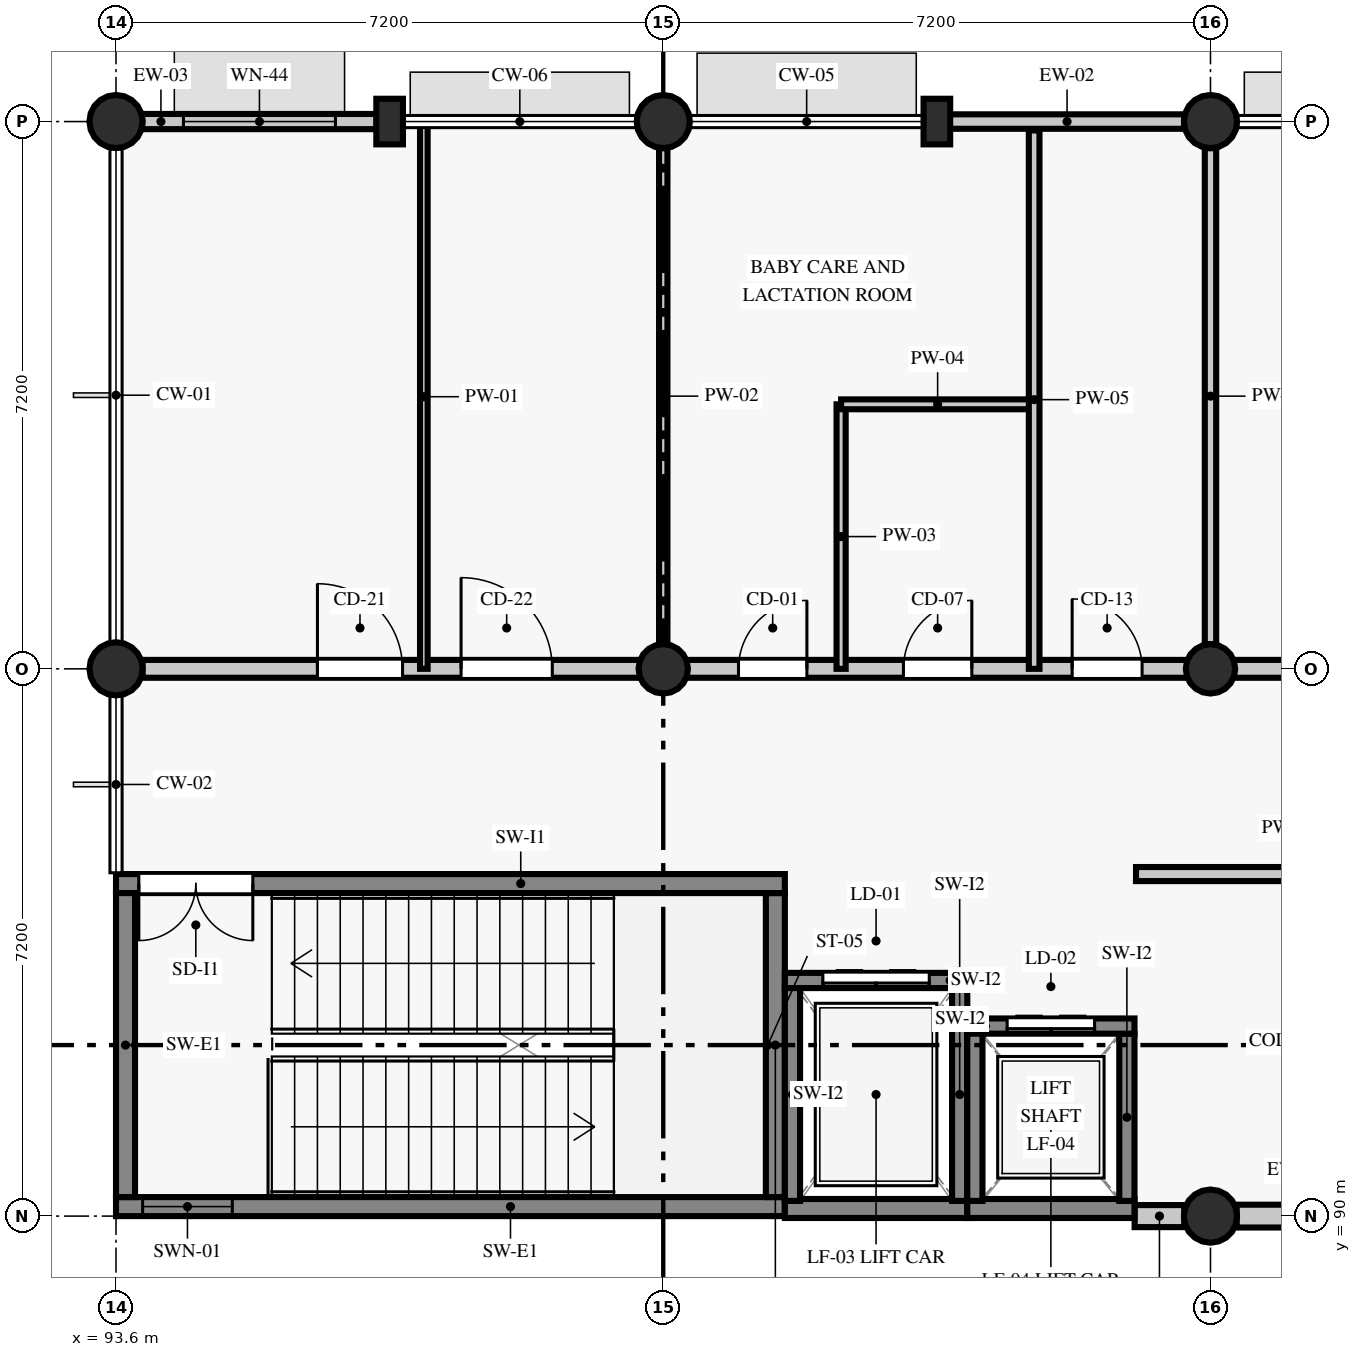
"""IFC4 building model, lengths in metres.
Left out: names, types, materials, properties, quantities, classifications, styles, units other than length and angle.
Written with IfcOpenShell. Run it as: python <this file> out.ifc"""

import sys

from ifc_helpers import new_model, si_unit, direction, frame, frame_2d, origin, origin_2d, place, context, subcontext, project, spatial, rectangle, circle, extrude, element, fill, save


model = new_model("IFC4")
c1 = context("Model", 3, precision=1e-05, world=origin(), true_north=direction((0.0, 1.0)))
c2 = subcontext(c1, "Body", "Model", "MODEL_VIEW")
j1 = project(units=[si_unit("LENGTHUNIT", "METRE"), si_unit("PLANEANGLEUNIT", "RADIAN")], contexts=[c1])
p1 = place(None, origin())
s1 = spatial("IfcSite", under=j1, at=p1, CompositionType="ELEMENT")
p2 = place(p1, origin())
s2 = spatial("IfcBuilding", under=s1, at=p2, CompositionType="ELEMENT")
p3 = place(p2, frame((0.0, 0.0, 4.8)))
s3 = spatial("IfcBuildingStorey", under=s2, at=p3, CompositionType="ELEMENT", Elevation=4.8)
for number, where, z_axis, x_axis in (
    (1, (93.6, 97.2, 0.0), (0.0, 0.0, 1.0), (1.0, 0.0, 0.0)),
    (2, (93.6, 104.4, 0.0), (0.0, 0.0, 1.0), (1.0, 0.0, 0.0)),
):
    element("IfcColumn", number, at=place(p3, frame(where, z_axis=z_axis, x_axis=x_axis)), inside=s3, PredefinedType="COLUMN", context=c2, shape_type="SweptSolid", body=[
        extrude(circle(Radius=0.35, at=origin_2d()), origin(), (0.0, 0.0, 1.0), 4.53),
    ])
p4 = place(p3, frame((100.8, 97.2, 0.0), z_axis=(0.0, 0.0, 1.0), x_axis=(1.0, 0.0, 0.0)))
e3 = element("IfcColumn", 3, at=p4, inside=s3, PredefinedType="COLUMN", context=c2, shape_type="SweptSolid", body=[
    extrude(circle(Radius=0.325, at=origin_2d()), origin(), (0.0, 0.0, 1.0), 4.53),
])
for number, where, z_axis, x_axis in (
    (4, (100.8, 104.4, 0.0), (0.0, 0.0, 1.0), (1.0, 0.0, 0.0)),
    (5, (108.0, 90.0, 0.0), (0.0, 0.0, 1.0), (1.0, 0.0, 0.0)),
):
    element("IfcColumn", number, at=place(p3, frame(where, z_axis=z_axis, x_axis=x_axis)), inside=s3, PredefinedType="COLUMN", context=c2, shape_type="SweptSolid", body=[
        extrude(circle(Radius=0.35, at=origin_2d()), origin(), (0.0, 0.0, 1.0), 4.53),
    ])
p5 = place(p3, frame((108.0, 97.2, 0.0), z_axis=(0.0, 0.0, 1.0), x_axis=(1.0, 0.0, 0.0)))
e6 = element("IfcColumn", 6, at=p5, inside=s3, PredefinedType="COLUMN", context=c2, shape_type="SweptSolid", body=[
    extrude(circle(Radius=0.325, at=origin_2d()), origin(), (0.0, 0.0, 1.0), 4.53),
])
p6 = place(p3, frame((108.0, 104.4, 0.0), z_axis=(0.0, 0.0, 1.0), x_axis=(1.0, 0.0, 0.0)))
e7 = element("IfcColumn", 7, at=p6, inside=s3, PredefinedType="COLUMN", context=c2, shape_type="SweptSolid", body=[
    extrude(circle(Radius=0.35, at=origin_2d()), origin(), (0.0, 0.0, 1.0), 4.53),
])
for number, where, z_axis, x_axis in (
    (8, (97.2, 104.4, 0.0), (0.0, 0.0, 1.0), (1.0, 0.0, 0.0)),
    (9, (104.4, 104.4, 0.0), (0.0, 0.0, 1.0), (1.0, 0.0, 0.0)),
):
    element("IfcColumn", number, at=place(p3, frame(where, z_axis=z_axis, x_axis=x_axis)), inside=s3, PredefinedType="PILASTER", context=c2, shape_type="SweptSolid", body=[
        extrude(rectangle(XDim=0.35, YDim=0.6, at=origin_2d()), origin(), (0.0, 0.0, 1.0), 4.53),
    ])
p7 = place(p3, frame((107.002, 90.0, 0.0), z_axis=(0.0, 0.0, 1.0), x_axis=(1.0, 0.0, 0.0)))
e10 = element("IfcWall", 10, at=p7, inside=s3, PredefinedType="STANDARD", context=c2, shape_type="SweptSolid", body=[
    extrude(rectangle(XDim=0.653, YDim=0.29, at=frame_2d((0.327, 0.0))), origin(), (0.0, 0.0, 1.0), 4.53),
])
p8 = place(p3, frame((108.345, 90.0, 0.0), z_axis=(0.0, 0.0, 1.0), x_axis=(1.0, 0.0, 0.0)))
e11 = element("IfcWall", 11, at=p8, inside=s3, PredefinedType="STANDARD", context=c2, shape_type="SweptSolid", body=[
    extrude(rectangle(XDim=5.253, YDim=0.3, at=frame_2d((2.626, 0.0))), origin(), (0.0, 0.0, 1.0), 4.53),
])
p9 = place(p8, frame((1.576, 0.0, 0.9)))
e12 = element("IfcOpeningElement", 12, at=p9, cuts=e11, PredefinedType="OPENING", context=c2, shape_type="SweptSolid", body=[
    extrude(rectangle(XDim=2.1, YDim=1.66, at=frame_2d((1.05, 0.83))), frame((0.0, 0.16, 0.0), z_axis=(0.0, -1.0, 0.0), x_axis=(1.0, 0.0, 0.0)), (0.0, 0.0, 1.0), 0.32),
])
p10 = place(p3, frame((107.655, 104.4, 0.0), z_axis=(0.0, 0.0, 1.0), x_axis=(-1.0, 0.0, 0.0)))
e13 = element("IfcWall", 13, at=p10, inside=s3, PredefinedType="STANDARD", context=c2, shape_type="SweptSolid", body=[
    extrude(rectangle(XDim=3.084, YDim=0.19, at=frame_2d((1.542, 0.0))), origin(), (0.0, 0.0, 1.0), 3.88),
])
p11 = place(p3, frame((97.029, 104.4, 0.0), z_axis=(0.0, 0.0, 1.0), x_axis=(-1.0, 0.0, 0.0)))
e14 = element("IfcWall", 14, at=p11, inside=s3, PredefinedType="STANDARD", context=c2, shape_type="SweptSolid", body=[
    extrude(rectangle(XDim=3.084, YDim=0.2, at=frame_2d((1.542, 0.0))), origin(), (0.0, 0.0, 1.0), 3.88),
])
p12 = place(p11, frame((0.542, 0.0, 0.9)))
e15 = element("IfcOpeningElement", 15, at=p12, cuts=e14, PredefinedType="OPENING", context=c2, shape_type="SweptSolid", body=[
    extrude(rectangle(XDim=2.0, YDim=1.78, at=frame_2d((1.0, 0.89))), frame((0.0, 0.11, 0.0), z_axis=(0.0, -1.0, 0.0), x_axis=(1.0, 0.0, 0.0)), (0.0, 0.0, 1.0), 0.22),
])
p13 = place(p3, frame((93.6, 90.125, 0.0), z_axis=(0.0, 0.0, 1.0), x_axis=(1.0, 0.0, 0.0)))
e16 = element("IfcWall", 16, at=p13, inside=s3, PredefinedType="SHEAR", context=c2, shape_type="SweptSolid", body=[
    extrude(rectangle(XDim=8.8, YDim=0.25, at=frame_2d((4.4, 0.0))), origin(), (0.0, 0.0, 1.0), 4.53),
])
p14 = place(p13, frame((0.35, 0.0, 0.92)))
e17 = element("IfcOpeningElement", 17, at=p14, cuts=e16, PredefinedType="OPENING", context=c2, shape_type="SweptSolid", body=[
    extrude(rectangle(XDim=1.18, YDim=1.48, at=frame_2d((0.59, 0.74))), frame((0.0, 0.135, 0.0), z_axis=(0.0, -1.0, 0.0), x_axis=(1.0, 0.0, 0.0)), (0.0, 0.0, 1.0), 0.27),
])
p15 = place(p3, frame((102.275, 90.25, 0.0), z_axis=(0.0, 0.0, 1.0), x_axis=(0.0, 1.0, 0.0)))
e18 = element("IfcWall", 18, at=p15, inside=s3, PredefinedType="SHEAR", context=c2, shape_type="SweptSolid", body=[
    extrude(rectangle(XDim=4.0, YDim=0.25, at=frame_2d((2.0, 0.0))), origin(), (0.0, 0.0, 1.0), 4.53),
])
p16 = place(p3, frame((102.4, 94.375, 0.0), z_axis=(0.0, 0.0, 1.0), x_axis=(-1.0, 0.0, 0.0)))
e19 = element("IfcWall", 19, at=p16, inside=s3, PredefinedType="SHEAR", context=c2, shape_type="SweptSolid", body=[
    extrude(rectangle(XDim=8.8, YDim=0.25, at=frame_2d((4.4, 0.0))), origin(), (0.0, 0.0, 1.0), 4.53),
])
p17 = place(p16, frame((7.0, 0.0, 0.0)))
e20 = element("IfcOpeningElement", 20, at=p17, cuts=e19, PredefinedType="OPENING", context=c2, shape_type="SweptSolid", body=[
    extrude(rectangle(XDim=1.5, YDim=2.15, at=frame_2d((0.75, 1.075))), frame((0.0, 0.135, 0.0), z_axis=(0.0, -1.0, 0.0), x_axis=(1.0, 0.0, 0.0)), (0.0, 0.0, 1.0), 0.27),
])
p18 = place(p3, frame((93.725, 94.25, 0.0), z_axis=(0.0, 0.0, 1.0), x_axis=(0.0, -1.0, 0.0)))
e21 = element("IfcWall", 21, at=p18, inside=s3, PredefinedType="SHEAR", context=c2, shape_type="SweptSolid", body=[
    extrude(rectangle(XDim=4.0, YDim=0.25, at=frame_2d((2.0, 0.0))), origin(), (0.0, 0.0, 1.0), 4.53),
])
p19 = place(p3, frame((102.4, 90.1, 0.0), z_axis=(0.0, 0.0, 1.0), x_axis=(1.0, 0.0, 0.0)))
e22 = element("IfcWall", 22, at=p19, inside=s3, PredefinedType="SHEAR", context=c2, shape_type="SweptSolid", body=[
    extrude(rectangle(XDim=2.4, YDim=0.25, at=frame_2d((1.2, 0.0))), origin(), (0.0, 0.0, 1.0), 4.53),
])
p20 = place(p3, frame((104.7, 90.2, 0.0), z_axis=(0.0, 0.0, 1.0), x_axis=(0.0, 1.0, 0.0)))
e23 = element("IfcWall", 23, at=p20, inside=s3, PredefinedType="SHEAR", context=c2, shape_type="SweptSolid", body=[
    extrude(rectangle(XDim=2.8, YDim=0.2, at=frame_2d((1.4, 0.0))), origin(), (0.0, 0.0, 1.0), 4.53),
])
p21 = place(p3, frame((104.8, 93.1, 0.0), z_axis=(0.0, 0.0, 1.0), x_axis=(-1.0, 0.0, 0.0)))
e24 = element("IfcWall", 24, at=p21, inside=s3, PredefinedType="SHEAR", context=c2, shape_type="SweptSolid", body=[
    extrude(rectangle(XDim=2.4, YDim=0.2, at=frame_2d((1.2, 0.0))), origin(), (0.0, 0.0, 1.0), 4.53),
])
p22 = place(p21, frame((0.5, 0.0, 0.0)))
e25 = element("IfcOpeningElement", 25, at=p22, cuts=e24, PredefinedType="OPENING", context=c2, shape_type="SweptSolid", body=[
    extrude(rectangle(XDim=1.4, YDim=2.15, at=frame_2d((0.7, 1.075))), frame((0.0, 0.11, 0.0), z_axis=(0.0, -1.0, 0.0), x_axis=(1.0, 0.0, 0.0)), (0.0, 0.0, 1.0), 0.22),
])
p23 = place(p3, frame((102.5, 93.0, 0.0), z_axis=(0.0, 0.0, 1.0), x_axis=(0.0, -1.0, 0.0)))
e26 = element("IfcWall", 26, at=p23, inside=s3, PredefinedType="SHEAR", context=c2, shape_type="SweptSolid", body=[
    extrude(rectangle(XDim=2.8, YDim=0.2, at=frame_2d((1.4, 0.0))), origin(), (0.0, 0.0, 1.0), 4.53),
])
p24 = place(p3, frame((104.8, 90.1, 0.0), z_axis=(0.0, 0.0, 1.0), x_axis=(1.0, 0.0, 0.0)))
e27 = element("IfcWall", 27, at=p24, inside=s3, PredefinedType="SHEAR", context=c2, shape_type="SweptSolid", body=[
    extrude(rectangle(XDim=2.2, YDim=0.25, at=frame_2d((1.1, 0.0))), origin(), (0.0, 0.0, 1.0), 4.53),
])
p25 = place(p3, frame((106.9, 90.2, 0.0), z_axis=(0.0, 0.0, 1.0), x_axis=(0.0, 1.0, 0.0)))
e28 = element("IfcWall", 28, at=p25, inside=s3, PredefinedType="SHEAR", context=c2, shape_type="SweptSolid", body=[
    extrude(rectangle(XDim=2.2, YDim=0.2, at=frame_2d((1.1, 0.0))), origin(), (0.0, 0.0, 1.0), 4.53),
])
p26 = place(p3, frame((107.0, 92.5, 0.0), z_axis=(0.0, 0.0, 1.0), x_axis=(-1.0, 0.0, 0.0)))
e29 = element("IfcWall", 29, at=p26, inside=s3, PredefinedType="SHEAR", context=c2, shape_type="SweptSolid", body=[
    extrude(rectangle(XDim=2.2, YDim=0.2, at=frame_2d((1.1, 0.0))), origin(), (0.0, 0.0, 1.0), 4.53),
])
p27 = place(p26, frame((0.525, 0.0, 0.0)))
e30 = element("IfcOpeningElement", 30, at=p27, cuts=e29, PredefinedType="OPENING", context=c2, shape_type="SweptSolid", body=[
    extrude(rectangle(XDim=1.15, YDim=2.15, at=frame_2d((0.575, 1.075))), frame((0.0, 0.11, 0.0), z_axis=(0.0, -1.0, 0.0), x_axis=(1.0, 0.0, 0.0)), (0.0, 0.0, 1.0), 0.22),
])
p28 = place(p3, frame((104.9, 92.4, 0.0), z_axis=(0.0, 0.0, 1.0), x_axis=(0.0, -1.0, 0.0)))
e31 = element("IfcWall", 31, at=p28, inside=s3, PredefinedType="SHEAR", context=c2, shape_type="SweptSolid", body=[
    extrude(rectangle(XDim=2.2, YDim=0.2, at=frame_2d((1.1, 0.0))), origin(), (0.0, 0.0, 1.0), 4.53),
])
p29 = place(p3, frame((93.95, 97.2, 0.0), z_axis=(0.0, 0.0, 1.0), x_axis=(1.0, 0.0, 0.0)))
e32 = element("IfcWall", 32, at=p29, inside=s3, PredefinedType="PARTITIONING", context=c2, shape_type="SweptSolid", body=[
    extrude(rectangle(XDim=28.1, YDim=0.235, at=frame_2d((14.05, 0.0))), origin(), (0.0, 0.0, 1.0), 3.78),
])
p30 = place(p29, frame((2.3, 0.0, 0.0)))
e33 = element("IfcOpeningElement", 33, at=p30, cuts=e32, PredefinedType="OPENING", context=c2, shape_type="SweptSolid", body=[
    extrude(rectangle(XDim=1.12, YDim=2.23, at=frame_2d((0.56, 1.115))), frame((0.0, 0.127, 0.0), z_axis=(0.0, -1.0, 0.0), x_axis=(1.0, 0.0, 0.0)), (0.0, 0.0, 1.0), 0.255),
])
p31 = place(p29, frame((4.19, 0.0, 0.0)))
e34 = element("IfcOpeningElement", 34, at=p31, cuts=e32, PredefinedType="OPENING", context=c2, shape_type="SweptSolid", body=[
    extrude(rectangle(XDim=1.2, YDim=2.23, at=frame_2d((0.6, 1.115))), frame((0.0, 0.127, 0.0), z_axis=(0.0, -1.0, 0.0), x_axis=(1.0, 0.0, 0.0)), (0.0, 0.0, 1.0), 0.255),
])
p32 = place(p29, frame((7.84, 0.0, 0.0)))
e35 = element("IfcOpeningElement", 35, at=p32, cuts=e32, PredefinedType="OPENING", context=c2, shape_type="SweptSolid", body=[
    extrude(rectangle(XDim=0.9, YDim=2.08, at=frame_2d((0.45, 1.04))), frame((0.0, 0.127, 0.0), z_axis=(0.0, -1.0, 0.0), x_axis=(1.0, 0.0, 0.0)), (0.0, 0.0, 1.0), 0.255),
])
p33 = place(p29, frame((10.01, 0.0, 0.0)))
e36 = element("IfcOpeningElement", 36, at=p33, cuts=e32, PredefinedType="OPENING", context=c2, shape_type="SweptSolid", body=[
    extrude(rectangle(XDim=0.9, YDim=2.13, at=frame_2d((0.45, 1.065))), frame((0.0, 0.127, 0.0), z_axis=(0.0, -1.0, 0.0), x_axis=(1.0, 0.0, 0.0)), (0.0, 0.0, 1.0), 0.255),
])
p34 = place(p29, frame((12.23, 0.0, 0.0)))
e37 = element("IfcOpeningElement", 37, at=p34, cuts=e32, PredefinedType="OPENING", context=c2, shape_type="SweptSolid", body=[
    extrude(rectangle(XDim=0.92, YDim=2.18, at=frame_2d((0.46, 1.09))), frame((0.0, 0.127, 0.0), z_axis=(0.0, -1.0, 0.0), x_axis=(1.0, 0.0, 0.0)), (0.0, 0.0, 1.0), 0.255),
])
p35 = place(p29, frame((16.705, 0.0, 0.0)))
e38 = element("IfcOpeningElement", 38, at=p35, cuts=e32, PredefinedType="OPENING", context=c2, shape_type="SweptSolid", body=[
    extrude(rectangle(XDim=1.02, YDim=2.08, at=frame_2d((0.51, 1.04))), frame((0.0, 0.127, 0.0), z_axis=(0.0, -1.0, 0.0), x_axis=(1.0, 0.0, 0.0)), (0.0, 0.0, 1.0), 0.255),
])
p36 = place(p29, frame((18.365, 0.0, 0.0)))
e39 = element("IfcOpeningElement", 39, at=p36, cuts=e32, PredefinedType="OPENING", context=c2, shape_type="SweptSolid", body=[
    extrude(rectangle(XDim=1.06, YDim=2.08, at=frame_2d((0.53, 1.04))), frame((0.0, 0.127, 0.0), z_axis=(0.0, -1.0, 0.0), x_axis=(1.0, 0.0, 0.0)), (0.0, 0.0, 1.0), 0.255),
])
p37 = place(p29, frame((24.513, 0.0, 0.0)))
e40 = element("IfcOpeningElement", 40, at=p37, cuts=e32, PredefinedType="OPENING", context=c2, shape_type="SweptSolid", body=[
    extrude(rectangle(XDim=1.1, YDim=2.08, at=frame_2d((0.55, 1.04))), frame((0.0, 0.127, 0.0), z_axis=(0.0, -1.0, 0.0), x_axis=(1.0, 0.0, 0.0)), (0.0, 0.0, 1.0), 0.255),
])
p38 = place(p3, frame((97.65, 97.2, 0.0), z_axis=(0.0, 0.0, 1.0), x_axis=(0.0, 1.0, 0.0)))
e41 = element("IfcWall", 41, at=p38, inside=s3, PredefinedType="PARTITIONING", context=c2, shape_type="SweptSolid", body=[
    extrude(rectangle(XDim=7.16, YDim=0.1, at=frame_2d((3.58, 0.0))), origin(), (0.0, 0.0, 1.0), 3.78),
])
p39 = place(p3, frame((100.8, 97.525, 0.0), z_axis=(0.0, 0.0, 1.0), x_axis=(0.0, 1.0, 0.0)))
e42 = element("IfcWall", 42, at=p39, inside=s3, PredefinedType="PARTITIONING", context=c2, shape_type="SweptSolid", body=[
    extrude(rectangle(XDim=6.525, YDim=0.11, at=frame_2d((3.263, 0.0))), origin(), (0.0, 0.0, 1.0), 3.98),
])
p40 = place(p3, frame((103.14, 97.2, 0.0), z_axis=(0.0, 0.0, 1.0), x_axis=(0.0, 1.0, 0.0)))
e43 = element("IfcWall", 43, at=p40, inside=s3, PredefinedType="PARTITIONING", context=c2, shape_type="SweptSolid", body=[
    extrude(rectangle(XDim=3.48, YDim=0.12, at=frame_2d((1.74, 0.0))), origin(), (0.0, 0.0, 1.0), 3.78),
])
p41 = place(p3, frame((103.14, 100.68, 0.0), z_axis=(0.0, 0.0, 1.0), x_axis=(1.0, 0.0, 0.0)))
e44 = element("IfcWall", 44, at=p41, inside=s3, PredefinedType="PARTITIONING", context=c2, shape_type="SweptSolid", body=[
    extrude(rectangle(XDim=2.54, YDim=0.13, at=frame_2d((1.27, 0.0))), origin(), (0.0, 0.0, 1.0), 4.23),
])
p42 = place(p3, frame((105.68, 97.2, 0.0), z_axis=(0.0, 0.0, 1.0), x_axis=(0.0, 1.0, 0.0)))
e45 = element("IfcWall", 45, at=p42, inside=s3, PredefinedType="PARTITIONING", context=c2, shape_type="SweptSolid", body=[
    extrude(rectangle(XDim=7.083, YDim=0.14, at=frame_2d((3.542, 0.0))), origin(), (0.0, 0.0, 1.0), 3.78),
])
p43 = place(p3, frame((108.0, 97.525, 0.0), z_axis=(0.0, 0.0, 1.0), x_axis=(0.0, 1.0, 0.0)))
e46 = element("IfcWall", 46, at=p43, inside=s3, PredefinedType="PARTITIONING", context=c2, shape_type="SweptSolid", body=[
    extrude(rectangle(XDim=6.525, YDim=0.15, at=frame_2d((3.263, 0.0))), origin(), (0.0, 0.0, 1.0), 3.98),
])
p44 = place(p3, frame((107.02, 94.5, 0.0), z_axis=(0.0, 0.0, 1.0), x_axis=(1.0, 0.0, 0.0)))
e47 = element("IfcWall", 47, at=p44, inside=s3, PredefinedType="PARTITIONING", context=c2, shape_type="SweptSolid", body=[
    extrude(rectangle(XDim=6.56, YDim=0.185, at=frame_2d((3.28, 0.0))), origin(), (0.0, 0.0, 1.0), 3.98),
])
p45 = place(p44, frame((4.07, 0.0, 0.0)))
e48 = element("IfcOpeningElement", 48, at=p45, cuts=e47, PredefinedType="OPENING", context=c2, shape_type="SweptSolid", body=[
    extrude(rectangle(XDim=0.9, YDim=2.13, at=frame_2d((0.45, 1.065))), frame((0.0, 0.103, 0.0), z_axis=(0.0, -1.0, 0.0), x_axis=(1.0, 0.0, 0.0)), (0.0, 0.0, 1.0), 0.205),
])
p46 = place(p12, origin())
e49 = element("IfcWindow", 49, at=p46, inside=s3, PartitioningType="SINGLE_PANEL", PredefinedType="WINDOW", context=c2, shape_type="SweptSolid", body=[
    extrude(rectangle(XDim=2.0, YDim=1.78, at=frame_2d((1.0, 0.89))), frame((0.0, 0.03, 0.0), z_axis=(0.0, -1.0, 0.0), x_axis=(1.0, 0.0, 0.0)), (0.0, 0.0, 1.0), 0.06),
])
fill(e15, e49)
p47 = place(p14, origin())
e50 = element("IfcWindow", 50, at=p47, inside=s3, PartitioningType="SINGLE_PANEL", PredefinedType="WINDOW", context=c2, shape_type="SweptSolid", body=[
    extrude(rectangle(XDim=1.18, YDim=1.48, at=frame_2d((0.59, 0.74))), frame((0.0, 0.03, 0.0), z_axis=(0.0, -1.0, 0.0), x_axis=(1.0, 0.0, 0.0)), (0.0, 0.0, 1.0), 0.06),
])
fill(e17, e50)
p48 = place(p17, origin())
e51 = element("IfcDoor", 51, at=p48, inside=s3, OperationType="DOUBLE_DOOR_SINGLE_SWING", PredefinedType="DOOR", context=c2, shape_type="SweptSolid", body=[
    extrude(rectangle(XDim=1.5, YDim=2.15, at=frame_2d((0.75, 1.075))), frame((0.0, 0.025, 0.0), z_axis=(0.0, -1.0, 0.0), x_axis=(1.0, 0.0, 0.0)), (0.0, 0.0, 1.0), 0.05),
])
fill(e20, e51)
p49 = place(p22, frame((1.4, 0.0, 0.0), z_axis=(0.0, 0.0, 1.0), x_axis=(-1.0, 0.0, 0.0)))
e52 = element("IfcDoor", 52, at=p49, inside=s3, OperationType="DOUBLE_DOOR_SLIDING", PredefinedType="DOOR", context=c2, shape_type="SweptSolid", body=[
    extrude(rectangle(XDim=1.4, YDim=2.15, at=frame_2d((0.7, 1.075))), frame((0.0, 0.025, 0.0), z_axis=(0.0, -1.0, 0.0), x_axis=(1.0, 0.0, 0.0)), (0.0, 0.0, 1.0), 0.05),
])
fill(e25, e52)
p50 = place(p27, frame((1.15, 0.0, 0.0), z_axis=(0.0, 0.0, 1.0), x_axis=(-1.0, 0.0, 0.0)))
e53 = element("IfcDoor", 53, at=p50, inside=s3, OperationType="DOUBLE_DOOR_SLIDING", PredefinedType="DOOR", context=c2, shape_type="SweptSolid", body=[
    extrude(rectangle(XDim=1.15, YDim=2.15, at=frame_2d((0.575, 1.075))), frame((0.0, 0.025, 0.0), z_axis=(0.0, -1.0, 0.0), x_axis=(1.0, 0.0, 0.0)), (0.0, 0.0, 1.0), 0.05),
])
fill(e30, e53)
p51 = place(p30, origin())
e54 = element("IfcDoor", 54, at=p51, inside=s3, OperationType="SINGLE_SWING_LEFT", PredefinedType="DOOR", context=c2, shape_type="SweptSolid", body=[
    extrude(rectangle(XDim=1.12, YDim=2.23, at=frame_2d((0.56, 1.115))), frame((0.0, 0.025, 0.0), z_axis=(0.0, -1.0, 0.0), x_axis=(1.0, 0.0, 0.0)), (0.0, 0.0, 1.0), 0.05),
])
fill(e33, e54)
p52 = place(p31, origin())
e55 = element("IfcDoor", 55, at=p52, inside=s3, OperationType="SINGLE_SWING_LEFT", PredefinedType="DOOR", context=c2, shape_type="SweptSolid", body=[
    extrude(rectangle(XDim=1.2, YDim=2.23, at=frame_2d((0.6, 1.115))), frame((0.0, 0.025, 0.0), z_axis=(0.0, -1.0, 0.0), x_axis=(1.0, 0.0, 0.0)), (0.0, 0.0, 1.0), 0.05),
])
fill(e34, e55)
p53 = place(p32, origin())
e56 = element("IfcDoor", 56, at=p53, inside=s3, OperationType="SINGLE_SWING_RIGHT", PredefinedType="DOOR", context=c2, shape_type="SweptSolid", body=[
    extrude(rectangle(XDim=0.9, YDim=2.08, at=frame_2d((0.45, 1.04))), frame((0.0, 0.025, 0.0), z_axis=(0.0, -1.0, 0.0), x_axis=(1.0, 0.0, 0.0)), (0.0, 0.0, 1.0), 0.05),
])
fill(e35, e56)
p54 = place(p33, origin())
e57 = element("IfcDoor", 57, at=p54, inside=s3, OperationType="SINGLE_SWING_RIGHT", PredefinedType="DOOR", context=c2, shape_type="SweptSolid", body=[
    extrude(rectangle(XDim=0.9, YDim=2.13, at=frame_2d((0.45, 1.065))), frame((0.0, 0.025, 0.0), z_axis=(0.0, -1.0, 0.0), x_axis=(1.0, 0.0, 0.0)), (0.0, 0.0, 1.0), 0.05),
])
fill(e36, e57)
p55 = place(p34, origin())
e58 = element("IfcDoor", 58, at=p55, inside=s3, OperationType="SINGLE_SWING_LEFT", PredefinedType="DOOR", context=c2, shape_type="SweptSolid", body=[
    extrude(rectangle(XDim=0.92, YDim=2.18, at=frame_2d((0.46, 1.09))), frame((0.0, 0.025, 0.0), z_axis=(0.0, -1.0, 0.0), x_axis=(1.0, 0.0, 0.0)), (0.0, 0.0, 1.0), 0.05),
])
fill(e37, e58)
save(model, sys.argv[1])
